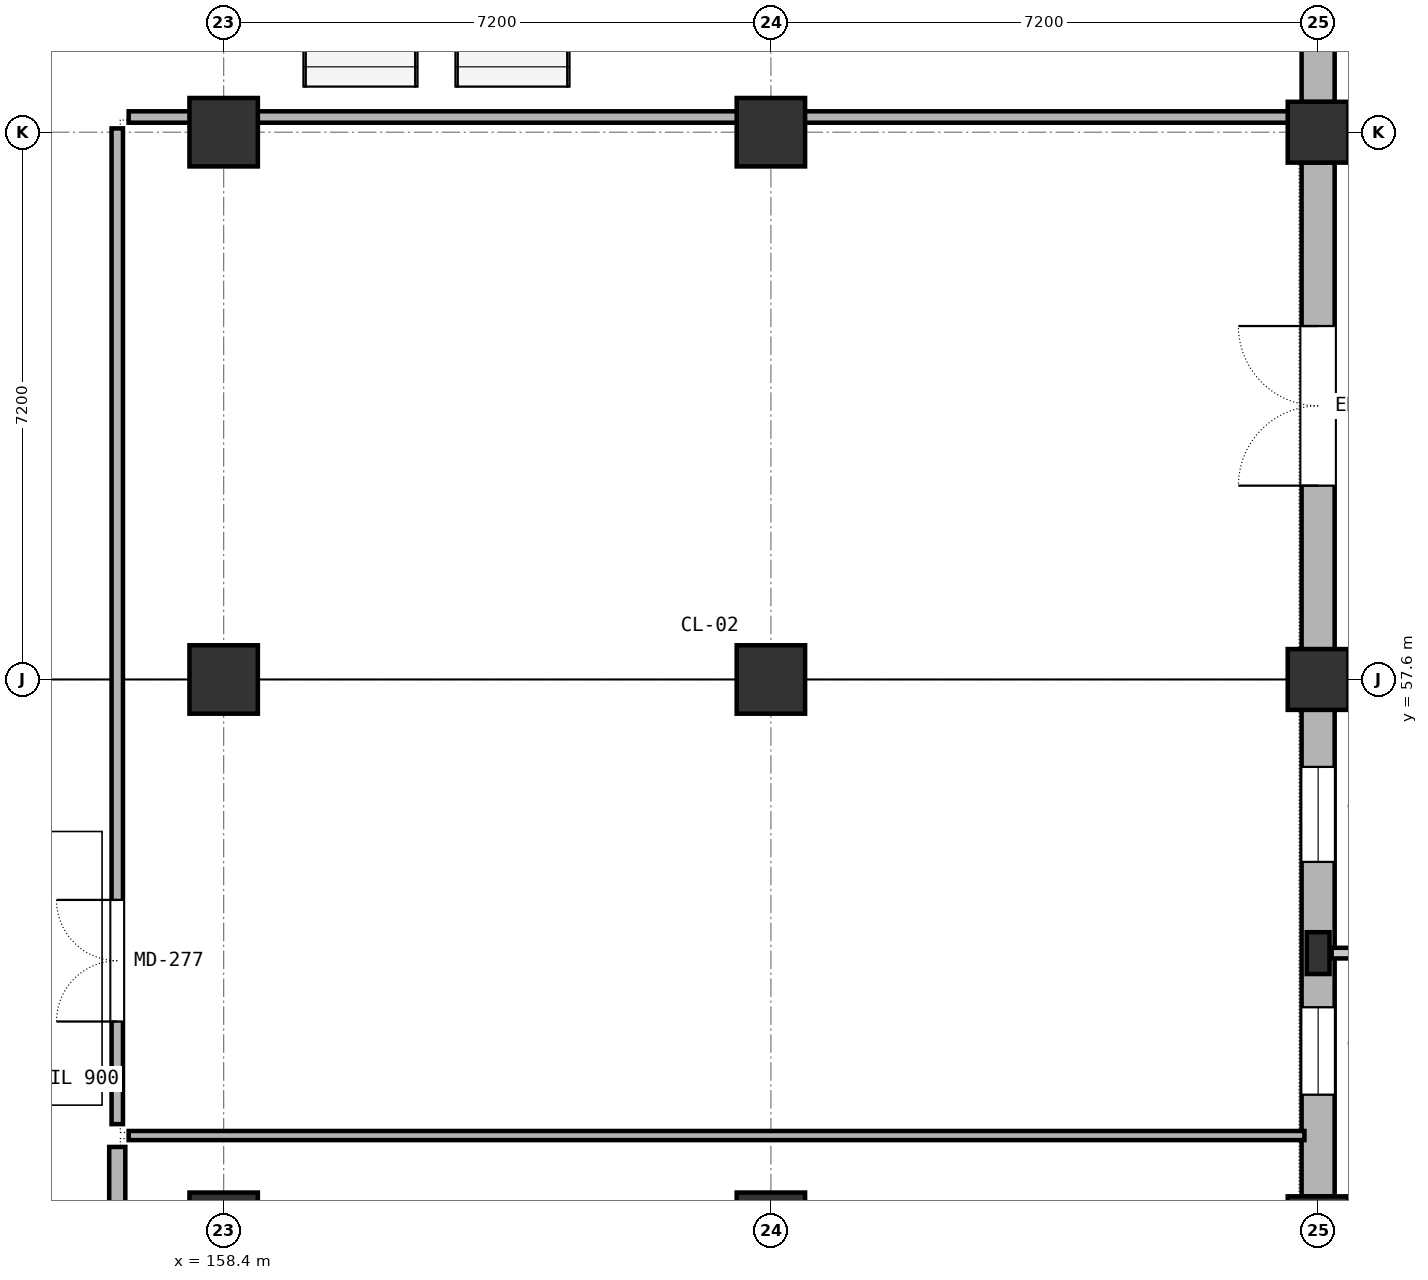
"""IFC4 building model, lengths in metres.
Left out: names, types, materials, properties, quantities, classifications, styles, units other than length and angle.
Written with IfcOpenShell. Run it as: python <this file> out.ifc"""

import sys

from ifc_helpers import new_model, si_unit, direction, frame, frame_2d, origin, origin_2d, place, context, subcontext, project, spatial, rectangle, extrude, element, fill, save


model = new_model("IFC4")
c1 = context("Model", 3, precision=1e-05, world=origin(), true_north=direction((0.0, 1.0)))
c2 = subcontext(c1, "Body", "Model", "MODEL_VIEW")
j1 = project(units=[si_unit("LENGTHUNIT", "METRE"), si_unit("PLANEANGLEUNIT", "RADIAN")], contexts=[c1])
p1 = place(None, origin())
s1 = spatial("IfcSite", under=j1, at=p1, CompositionType="ELEMENT")
p2 = place(p1, origin())
s2 = spatial("IfcBuilding", under=s1, at=p2, CompositionType="ELEMENT")
p3 = place(p2, origin())
s3 = spatial("IfcBuildingStorey", under=s2, at=p3, CompositionType="ELEMENT", Elevation=0.0)
for number, where, z_axis, x_axis in (
    (1, (158.4, 50.4, 0.0), (0.0, 0.0, 1.0), (1.0, 0.0, 0.0)),
    (2, (158.4, 57.6, 0.0), (0.0, 0.0, 1.0), (1.0, 0.0, 0.0)),
    (3, (158.4, 64.8, 0.0), (0.0, 0.0, 1.0), (1.0, 0.0, 0.0)),
    (4, (165.6, 50.4, 0.0), (0.0, 0.0, 1.0), (1.0, 0.0, 0.0)),
    (5, (165.6, 57.6, 0.0), (0.0, 0.0, 1.0), (1.0, 0.0, 0.0)),
    (6, (165.6, 64.8, 0.0), (0.0, 0.0, 1.0), (1.0, 0.0, 0.0)),
):
    element("IfcColumn", number, at=place(p3, frame(where, z_axis=z_axis, x_axis=x_axis)), inside=s3, PredefinedType="COLUMN", context=c2, shape_type="SweptSolid", body=[
        extrude(rectangle(XDim=0.9, YDim=0.9, at=origin_2d()), origin(), (0.0, 0.0, 1.0), 5.4),
    ])
for number, where, z_axis, x_axis in (
    (7, (172.8, 50.4, 0.0), (0.0, 0.0, 1.0), (1.0, 0.0, 0.0)),
    (8, (172.8, 57.6, 0.0), (0.0, 0.0, 1.0), (1.0, 0.0, 0.0)),
    (9, (172.8, 64.8, 0.0), (0.0, 0.0, 1.0), (1.0, 0.0, 0.0)),
):
    element("IfcColumn", number, at=place(p3, frame(where, z_axis=z_axis, x_axis=x_axis)), inside=s3, PredefinedType="COLUMN", context=c2, shape_type="SweptSolid", body=[
        extrude(rectangle(XDim=0.8, YDim=0.8, at=origin_2d()), origin(), (0.0, 0.0, 1.0), 5.4),
    ])
p4 = place(p3, frame((172.8, 54.0, 0.0), z_axis=(0.0, 0.0, 1.0), x_axis=(0.0, 1.0, 0.0)))
e10 = element("IfcColumn", 10, at=p4, inside=s3, PredefinedType="PILASTER", context=c2, shape_type="SweptSolid", body=[
    extrude(rectangle(XDim=0.55, YDim=0.3, at=origin_2d()), origin(), (0.0, 0.0, 1.0), 5.4),
])
p5 = place(p3, frame((172.8, 57.202, 0.0), z_axis=(0.0, 0.0, 1.0), x_axis=(0.0, -1.0, 0.0)))
e11 = element("IfcWall", 11, at=p5, inside=s3, PredefinedType="SOLIDWALL", context=c2, shape_type="SweptSolid", body=[
    extrude(rectangle(XDim=6.404, YDim=0.435, at=frame_2d((3.202, 0.0))), origin(), (0.0, 0.0, 1.0), 4.1),
])
p6 = place(p5, frame((0.752, 0.0, 0.65)))
e12 = element("IfcOpeningElement", 12, at=p6, cuts=e11, PredefinedType="OPENING", context=c2, shape_type="SweptSolid", body=[
    extrude(rectangle(XDim=1.25, YDim=2.8, at=frame_2d((0.625, 1.4))), frame((0.0, 0.228, 0.0), z_axis=(0.0, -1.0, 0.0), x_axis=(1.0, 0.0, 0.0)), (0.0, 0.0, 1.0), 0.455),
])
p7 = place(p5, frame((3.915, 0.0, 0.65)))
e13 = element("IfcOpeningElement", 13, at=p7, cuts=e11, PredefinedType="OPENING", context=c2, shape_type="SweptSolid", body=[
    extrude(rectangle(XDim=1.15, YDim=2.3, at=frame_2d((0.575, 1.15))), frame((0.0, 0.228, 0.0), z_axis=(0.0, -1.0, 0.0), x_axis=(1.0, 0.0, 0.0)), (0.0, 0.0, 1.0), 0.455),
])
p8 = place(p3, frame((172.8, 64.402, 0.0), z_axis=(0.0, 0.0, 1.0), x_axis=(0.0, -1.0, 0.0)))
e14 = element("IfcWall", 14, at=p8, inside=s3, PredefinedType="SOLIDWALL", context=c2, shape_type="SweptSolid", body=[
    extrude(rectangle(XDim=6.404, YDim=0.435, at=frame_2d((3.202, 0.0))), origin(), (0.0, 0.0, 1.0), 4.1),
])
p9 = place(p8, frame((2.152, 0.0, 0.0)))
e15 = element("IfcOpeningElement", 15, at=p9, cuts=e14, PredefinedType="OPENING", context=c2, shape_type="SweptSolid", body=[
    extrude(rectangle(XDim=2.1, YDim=2.7, at=frame_2d((1.05, 1.35))), frame((0.0, 0.228, 0.0), z_axis=(0.0, -1.0, 0.0), x_axis=(1.0, 0.0, 0.0)), (0.0, 0.0, 1.0), 0.455),
])
p10 = place(p3, frame((172.8, 71.602, 0.0), z_axis=(0.0, 0.0, 1.0), x_axis=(0.0, -1.0, 0.0)))
e16 = element("IfcWall", 16, at=p10, inside=s3, PredefinedType="SOLIDWALL", context=c2, shape_type="SweptSolid", body=[
    extrude(rectangle(XDim=6.404, YDim=0.435, at=frame_2d((3.202, 0.0))), origin(), (0.0, 0.0, 1.0), 4.1),
])
p11 = place(p10, frame((0.752, 0.0, 0.65)))
e17 = element("IfcOpeningElement", 17, at=p11, cuts=e16, PredefinedType="OPENING", context=c2, shape_type="SweptSolid", body=[
    extrude(rectangle(XDim=1.25, YDim=2.8, at=frame_2d((0.625, 1.4))), frame((0.0, 0.228, 0.0), z_axis=(0.0, -1.0, 0.0), x_axis=(1.0, 0.0, 0.0)), (0.0, 0.0, 1.0), 0.455),
])
p12 = place(p10, frame((4.302, 0.0, 0.65)))
e18 = element("IfcOpeningElement", 18, at=p12, cuts=e16, PredefinedType="OPENING", context=c2, shape_type="SweptSolid", body=[
    extrude(rectangle(XDim=1.15, YDim=2.3, at=frame_2d((0.575, 1.15))), frame((0.0, 0.228, 0.0), z_axis=(0.0, -1.0, 0.0), x_axis=(1.0, 0.0, 0.0)), (0.0, 0.0, 1.0), 0.455),
])
p13 = place(p3, frame((157.0, 36.95, 0.0), z_axis=(0.0, 0.0, 1.0), x_axis=(0.0, 1.0, 0.0)))
e19 = element("IfcWall", 19, at=p13, inside=s3, PredefinedType="PARTITIONING", context=c2, shape_type="SweptSolid", body=[
    extrude(rectangle(XDim=14.5, YDim=0.212, at=frame_2d((7.25, 0.0))), origin(), (0.0, 0.0, 1.0), 4.12),
])
p14 = place(p13, frame((1.65, 0.0, 0.0)))
e20 = element("IfcOpeningElement", 20, at=p14, cuts=e19, PredefinedType="OPENING", context=c2, shape_type="SweptSolid", body=[
    extrude(rectangle(XDim=1.0, YDim=2.2, at=frame_2d((0.5, 1.1))), frame((0.0, 0.116, 0.0), z_axis=(0.0, -1.0, 0.0), x_axis=(1.0, 0.0, 0.0)), (0.0, 0.0, 1.0), 0.232),
])
p15 = place(p3, frame((157.0, 51.75, 0.0), z_axis=(0.0, 0.0, 1.0), x_axis=(0.0, 1.0, 0.0)))
e21 = element("IfcWall", 21, at=p15, inside=s3, PredefinedType="PARTITIONING", context=c2, shape_type="SweptSolid", body=[
    extrude(rectangle(XDim=13.1, YDim=0.15, at=frame_2d((6.55, 0.0))), origin(), (0.0, 0.0, 1.0), 4.12),
])
p16 = place(p15, frame((1.35, 0.0, 0.0)))
e22 = element("IfcOpeningElement", 22, at=p16, cuts=e21, PredefinedType="OPENING", context=c2, shape_type="SweptSolid", body=[
    extrude(rectangle(XDim=1.6, YDim=2.2, at=frame_2d((0.8, 1.1))), frame((0.0, 0.085, 0.0), z_axis=(0.0, -1.0, 0.0), x_axis=(1.0, 0.0, 0.0)), (0.0, 0.0, 1.0), 0.17),
])
p17 = place(p3, frame((157.15, 51.6, 0.0), z_axis=(0.0, 0.0, 1.0), x_axis=(1.0, 0.0, 0.0)))
e23 = element("IfcWall", 23, at=p17, inside=s3, PredefinedType="PARTITIONING", context=c2, shape_type="SweptSolid", body=[
    extrude(rectangle(XDim=15.47, YDim=0.12, at=frame_2d((7.735, 0.0))), origin(), (0.0, 0.0, 1.0), 4.12),
])
p18 = place(p3, frame((157.15, 65.0, 0.0), z_axis=(0.0, 0.0, 1.0), x_axis=(1.0, 0.0, 0.0)))
e24 = element("IfcWall", 24, at=p18, inside=s3, PredefinedType="PARTITIONING", context=c2, shape_type="SweptSolid", body=[
    extrude(rectangle(XDim=15.47, YDim=0.15, at=frame_2d((7.735, 0.0))), origin(), (0.0, 0.0, 1.0), 4.12),
])
p19 = place(p6, origin())
e25 = element("IfcWindow", 25, at=p19, inside=s3, PartitioningType="DOUBLE_PANEL_VERTICAL", PredefinedType="WINDOW", context=c2, shape_type="SweptSolid", body=[
    extrude(rectangle(XDim=1.25, YDim=2.8, at=frame_2d((0.625, 1.4))), frame((0.0, 0.03, 0.0), z_axis=(0.0, -1.0, 0.0), x_axis=(1.0, 0.0, 0.0)), (0.0, 0.0, 1.0), 0.06),
])
fill(e12, e25)
p20 = place(p7, origin())
e26 = element("IfcWindow", 26, at=p20, inside=s3, PartitioningType="SINGLE_PANEL", PredefinedType="WINDOW", context=c2, shape_type="SweptSolid", body=[
    extrude(rectangle(XDim=1.15, YDim=2.3, at=frame_2d((0.575, 1.15))), frame((0.0, 0.03, 0.0), z_axis=(0.0, -1.0, 0.0), x_axis=(1.0, 0.0, 0.0)), (0.0, 0.0, 1.0), 0.06),
])
fill(e13, e26)
p21 = place(p9, frame((2.1, 0.0, 0.0), z_axis=(0.0, 0.0, 1.0), x_axis=(-1.0, 0.0, 0.0)))
e27 = element("IfcDoor", 27, at=p21, inside=s3, OperationType="DOUBLE_DOOR_SINGLE_SWING", PredefinedType="DOOR", context=c2, shape_type="SweptSolid", body=[
    extrude(rectangle(XDim=2.1, YDim=2.7, at=frame_2d((1.05, 1.35))), frame((0.0, 0.025, 0.0), z_axis=(0.0, -1.0, 0.0), x_axis=(1.0, 0.0, 0.0)), (0.0, 0.0, 1.0), 0.05),
])
fill(e15, e27)
p22 = place(p16, origin())
e28 = element("IfcDoor", 28, at=p22, inside=s3, OperationType="DOUBLE_DOOR_SINGLE_SWING", PredefinedType="DOOR", context=c2, shape_type="SweptSolid", body=[
    extrude(rectangle(XDim=1.6, YDim=2.2, at=frame_2d((0.8, 1.1))), frame((0.0, 0.025, 0.0), z_axis=(0.0, -1.0, 0.0), x_axis=(1.0, 0.0, 0.0)), (0.0, 0.0, 1.0), 0.05),
])
fill(e22, e28)
save(model, sys.argv[1])
